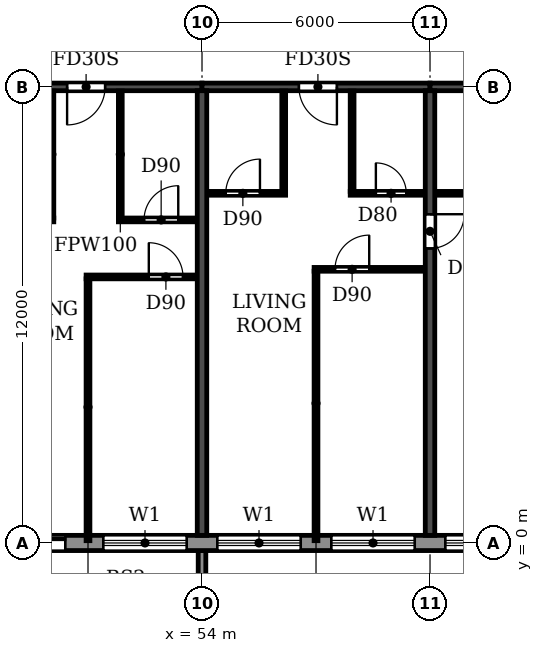
"""IFC4 building model, lengths in metres.
Left out: names, types, materials, properties, quantities, classifications, styles, units other than length and angle.
Written with IfcOpenShell. Run it as: python <this file> out.ifc"""

import sys

from ifc_helpers import new_model, si_unit, direction, frame, frame_2d, origin, place, context, subcontext, project, spatial, polyline, rectangle, outline, extrude, source, transform, mapped, element, fill, save


model = new_model("IFC4")
c1 = context("Model", 3, precision=1e-05, world=origin(), true_north=direction((0.0, 1.0)))
c2 = subcontext(c1, "Body", "Model", "MODEL_VIEW")
j1 = project(units=[si_unit("LENGTHUNIT", "METRE"), si_unit("PLANEANGLEUNIT", "RADIAN")], contexts=[c1])
p1 = place(None, origin())
s1 = spatial("IfcSite", under=j1, at=p1, CompositionType="ELEMENT")
p2 = place(p1, origin())
s2 = spatial("IfcBuilding", under=s1, at=p2, CompositionType="ELEMENT")
p3 = place(p2, frame((0.0, 0.0, 208.2)))
s3 = spatial("IfcBuildingStorey", under=s2, at=p3, CompositionType="ELEMENT", Elevation=208.2)
p4 = place(p3, frame((54.0, 0.2, 0.0), z_axis=(0.0, 0.0, 1.0), x_axis=(0.0, 1.0, 0.0)))
e1 = element("IfcWall", 1, at=p4, inside=s3, PredefinedType="SHEAR", context=c2, shape_type="SweptSolid", body=[
    extrude(rectangle(XDim=11.7, YDim=0.25, at=frame_2d((5.85, 0.0))), origin(), (0.0, 0.0, 1.0), 3.0),
])
p5 = place(p3, frame((60.0, 0.2, 0.0), z_axis=(0.0, 0.0, 1.0), x_axis=(0.0, 1.0, 0.0)))
e2 = element("IfcWall", 2, at=p5, inside=s3, PredefinedType="SHEAR", context=c2, shape_type="SweptSolid", body=[
    extrude(rectangle(XDim=11.7, YDim=0.25, at=frame_2d((5.85, 0.0))), origin(), (0.0, 0.0, 1.0), 3.0),
])
p6 = place(p5, frame((7.55, 0.0, 0.0)))
e3 = element("IfcOpeningElement", 3, at=p6, cuts=e2, PredefinedType="OPENING", context=c2, shape_type="SweptSolid", body=[
    extrude(rectangle(XDim=0.9, YDim=2.1, at=frame_2d((0.45, 1.05))), frame((0.0, 0.135, 0.0), z_axis=(0.0, -1.0, 0.0), x_axis=(1.0, 0.0, 0.0)), (0.0, 0.0, 1.0), 0.27),
])
p7 = place(p3, frame((48.0, 12.0, 0.0), z_axis=(0.0, 0.0, 1.0), x_axis=(1.0, 0.0, 0.0)))
e4 = element("IfcWall", 4, at=p7, inside=s3, PredefinedType="SHEAR", context=c2, shape_type="SweptSolid", body=[
    extrude(rectangle(XDim=6.0, YDim=0.2, at=frame_2d((3.0, 0.0))), origin(), (0.0, 0.0, 1.0), 2.4),
])
p8 = place(p7, frame((2.45, 0.0, 0.0)))
e5 = element("IfcOpeningElement", 5, at=p8, cuts=e4, PredefinedType="OPENING", context=c2, shape_type="SweptSolid", body=[
    extrude(rectangle(XDim=1.0, YDim=2.1, at=frame_2d((0.5, 1.05))), frame((0.0, 0.11, 0.0), z_axis=(0.0, -1.0, 0.0), x_axis=(1.0, 0.0, 0.0)), (0.0, 0.0, 1.0), 0.22),
])
p9 = place(p3, frame((54.0, 12.0, 0.0), z_axis=(0.0, 0.0, 1.0), x_axis=(1.0, 0.0, 0.0)))
e6 = element("IfcWall", 6, at=p9, inside=s3, PredefinedType="SHEAR", context=c2, shape_type="SweptSolid", body=[
    extrude(rectangle(XDim=6.0, YDim=0.2, at=frame_2d((3.0, 0.0))), origin(), (0.0, 0.0, 1.0), 2.4),
])
p10 = place(p9, frame((2.55, 0.0, 0.0)))
e7 = element("IfcOpeningElement", 7, at=p10, cuts=e6, PredefinedType="OPENING", context=c2, shape_type="SweptSolid", body=[
    extrude(rectangle(XDim=1.0, YDim=2.1, at=frame_2d((0.5, 1.05))), frame((0.0, 0.11, 0.0), z_axis=(0.0, -1.0, 0.0), x_axis=(1.0, 0.0, 0.0)), (0.0, 0.0, 1.0), 0.22),
])
p11 = place(p3, frame((60.0, 12.0, 0.0), z_axis=(0.0, 0.0, 1.0), x_axis=(1.0, 0.0, 0.0)))
e8 = element("IfcWall", 8, at=p11, inside=s3, PredefinedType="SHEAR", context=c2, shape_type="SweptSolid", body=[
    extrude(rectangle(XDim=6.0, YDim=0.2, at=frame_2d((3.0, 0.0))), origin(), (0.0, 0.0, 1.0), 2.4),
])
p12 = place(p3, frame((22.683, 0.0, 0.0), z_axis=(0.0, 0.0, 1.0), x_axis=(1.0, 0.0, 0.0)))
e9 = element("IfcWall", 9, at=p12, inside=s3, PredefinedType="STANDARD", context=c2, shape_type="SweptSolid", body=[
    extrude(rectangle(XDim=56.634, YDim=0.4, at=frame_2d((28.317, 0.0))), origin(), (0.0, 0.0, 1.0), 3.0),
])
p13 = place(p12, frame((1.917, 0.0, 0.0)))
e10 = element("IfcOpeningElement", 10, at=p13, cuts=e9, PredefinedType="OPENING", context=c2, shape_type="SweptSolid", body=[
    extrude(rectangle(XDim=1.8, YDim=2.4, at=frame_2d((0.9, 1.2))), frame((0.0, 0.21, 0.0), z_axis=(0.0, -1.0, 0.0), x_axis=(1.0, 0.0, 0.0)), (0.0, 0.0, 1.0), 0.42),
])
p14 = place(p12, frame((4.717, 0.0, 0.9)))
e11 = element("IfcOpeningElement", 11, at=p14, cuts=e9, PredefinedType="OPENING", context=c2, shape_type="SweptSolid", body=[
    extrude(rectangle(XDim=2.2, YDim=1.5, at=frame_2d((1.1, 0.75))), frame((0.0, 0.21, 0.0), z_axis=(0.0, -1.0, 0.0), x_axis=(1.0, 0.0, 0.0)), (0.0, 0.0, 1.0), 0.42),
])
p15 = place(p12, frame((7.717, 0.0, 0.9)))
e12 = element("IfcOpeningElement", 12, at=p15, cuts=e9, PredefinedType="OPENING", context=c2, shape_type="SweptSolid", body=[
    extrude(rectangle(XDim=2.2, YDim=1.5, at=frame_2d((1.1, 0.75))), frame((0.0, 0.21, 0.0), z_axis=(0.0, -1.0, 0.0), x_axis=(1.0, 0.0, 0.0)), (0.0, 0.0, 1.0), 0.42),
])
p16 = place(p12, frame((10.717, 0.0, 0.9)))
e13 = element("IfcOpeningElement", 13, at=p16, cuts=e9, PredefinedType="OPENING", context=c2, shape_type="SweptSolid", body=[
    extrude(rectangle(XDim=2.2, YDim=1.5, at=frame_2d((1.1, 0.75))), frame((0.0, 0.21, 0.0), z_axis=(0.0, -1.0, 0.0), x_axis=(1.0, 0.0, 0.0)), (0.0, 0.0, 1.0), 0.42),
])
p17 = place(p12, frame((13.917, 0.0, 0.0)))
e14 = element("IfcOpeningElement", 14, at=p17, cuts=e9, PredefinedType="OPENING", context=c2, shape_type="SweptSolid", body=[
    extrude(rectangle(XDim=1.8, YDim=2.4, at=frame_2d((0.9, 1.2))), frame((0.0, 0.21, 0.0), z_axis=(0.0, -1.0, 0.0), x_axis=(1.0, 0.0, 0.0)), (0.0, 0.0, 1.0), 0.42),
])
p18 = place(p12, frame((16.717, 0.0, 0.9)))
e15 = element("IfcOpeningElement", 15, at=p18, cuts=e9, PredefinedType="OPENING", context=c2, shape_type="SweptSolid", body=[
    extrude(rectangle(XDim=2.2, YDim=1.5, at=frame_2d((1.1, 0.75))), frame((0.0, 0.21, 0.0), z_axis=(0.0, -1.0, 0.0), x_axis=(1.0, 0.0, 0.0)), (0.0, 0.0, 1.0), 0.42),
])
p19 = place(p12, frame((19.717, 0.0, 0.9)))
e16 = element("IfcOpeningElement", 16, at=p19, cuts=e9, PredefinedType="OPENING", context=c2, shape_type="SweptSolid", body=[
    extrude(rectangle(XDim=2.2, YDim=1.5, at=frame_2d((1.1, 0.75))), frame((0.0, 0.21, 0.0), z_axis=(0.0, -1.0, 0.0), x_axis=(1.0, 0.0, 0.0)), (0.0, 0.0, 1.0), 0.42),
])
p20 = place(p12, frame((22.717, 0.0, 0.9)))
e17 = element("IfcOpeningElement", 17, at=p20, cuts=e9, PredefinedType="OPENING", context=c2, shape_type="SweptSolid", body=[
    extrude(rectangle(XDim=2.2, YDim=1.5, at=frame_2d((1.1, 0.75))), frame((0.0, 0.21, 0.0), z_axis=(0.0, -1.0, 0.0), x_axis=(1.0, 0.0, 0.0)), (0.0, 0.0, 1.0), 0.42),
])
p21 = place(p12, frame((25.917, 0.0, 0.0)))
e18 = element("IfcOpeningElement", 18, at=p21, cuts=e9, PredefinedType="OPENING", context=c2, shape_type="SweptSolid", body=[
    extrude(rectangle(XDim=1.8, YDim=2.4, at=frame_2d((0.9, 1.2))), frame((0.0, 0.21, 0.0), z_axis=(0.0, -1.0, 0.0), x_axis=(1.0, 0.0, 0.0)), (0.0, 0.0, 1.0), 0.42),
])
p22 = place(p12, frame((28.717, 0.0, 0.9)))
e19 = element("IfcOpeningElement", 19, at=p22, cuts=e9, PredefinedType="OPENING", context=c2, shape_type="SweptSolid", body=[
    extrude(rectangle(XDim=2.2, YDim=1.5, at=frame_2d((1.1, 0.75))), frame((0.0, 0.21, 0.0), z_axis=(0.0, -1.0, 0.0), x_axis=(1.0, 0.0, 0.0)), (0.0, 0.0, 1.0), 0.42),
])
p23 = place(p12, frame((31.717, 0.0, 0.9)))
e20 = element("IfcOpeningElement", 20, at=p23, cuts=e9, PredefinedType="OPENING", context=c2, shape_type="SweptSolid", body=[
    extrude(rectangle(XDim=2.2, YDim=1.5, at=frame_2d((1.1, 0.75))), frame((0.0, 0.21, 0.0), z_axis=(0.0, -1.0, 0.0), x_axis=(1.0, 0.0, 0.0)), (0.0, 0.0, 1.0), 0.42),
])
p24 = place(p12, frame((34.717, 0.0, 0.9)))
e21 = element("IfcOpeningElement", 21, at=p24, cuts=e9, PredefinedType="OPENING", context=c2, shape_type="SweptSolid", body=[
    extrude(rectangle(XDim=2.2, YDim=1.5, at=frame_2d((1.1, 0.75))), frame((0.0, 0.21, 0.0), z_axis=(0.0, -1.0, 0.0), x_axis=(1.0, 0.0, 0.0)), (0.0, 0.0, 1.0), 0.42),
])
p25 = place(p12, frame((37.717, 0.0, 0.9)))
e22 = element("IfcOpeningElement", 22, at=p25, cuts=e9, PredefinedType="OPENING", context=c2, shape_type="SweptSolid", body=[
    extrude(rectangle(XDim=2.2, YDim=1.5, at=frame_2d((1.1, 0.75))), frame((0.0, 0.21, 0.0), z_axis=(0.0, -1.0, 0.0), x_axis=(1.0, 0.0, 0.0)), (0.0, 0.0, 1.0), 0.42),
])
p26 = place(p12, frame((40.717, 0.0, 0.9)))
e23 = element("IfcOpeningElement", 23, at=p26, cuts=e9, PredefinedType="OPENING", context=c2, shape_type="SweptSolid", body=[
    extrude(rectangle(XDim=2.2, YDim=1.5, at=frame_2d((1.1, 0.75))), frame((0.0, 0.21, 0.0), z_axis=(0.0, -1.0, 0.0), x_axis=(1.0, 0.0, 0.0)), (0.0, 0.0, 1.0), 0.42),
])
p27 = place(p12, frame((43.717, 0.0, 0.9)))
e24 = element("IfcOpeningElement", 24, at=p27, cuts=e9, PredefinedType="OPENING", context=c2, shape_type="SweptSolid", body=[
    extrude(rectangle(XDim=2.2, YDim=1.5, at=frame_2d((1.1, 0.75))), frame((0.0, 0.21, 0.0), z_axis=(0.0, -1.0, 0.0), x_axis=(1.0, 0.0, 0.0)), (0.0, 0.0, 1.0), 0.42),
])
p28 = place(p12, frame((46.717, 0.0, 0.9)))
e25 = element("IfcOpeningElement", 25, at=p28, cuts=e9, PredefinedType="OPENING", context=c2, shape_type="SweptSolid", body=[
    extrude(rectangle(XDim=2.2, YDim=1.5, at=frame_2d((1.1, 0.75))), frame((0.0, 0.21, 0.0), z_axis=(0.0, -1.0, 0.0), x_axis=(1.0, 0.0, 0.0)), (0.0, 0.0, 1.0), 0.42),
])
p29 = place(p12, frame((49.717, 0.0, 0.9)))
e26 = element("IfcOpeningElement", 26, at=p29, cuts=e9, PredefinedType="OPENING", context=c2, shape_type="SweptSolid", body=[
    extrude(rectangle(XDim=2.2, YDim=1.5, at=frame_2d((1.1, 0.75))), frame((0.0, 0.21, 0.0), z_axis=(0.0, -1.0, 0.0), x_axis=(1.0, 0.0, 0.0)), (0.0, 0.0, 1.0), 0.42),
])
p30 = place(p12, frame((52.917, 0.0, 0.0)))
e27 = element("IfcOpeningElement", 27, at=p30, cuts=e9, PredefinedType="OPENING", context=c2, shape_type="SweptSolid", body=[
    extrude(rectangle(XDim=1.8, YDim=2.4, at=frame_2d((0.9, 1.2))), frame((0.0, 0.21, 0.0), z_axis=(0.0, -1.0, 0.0), x_axis=(1.0, 0.0, 0.0)), (0.0, 0.0, 1.0), 0.42),
])
m1 = source(origin(), c2, "Body", "SweptSolid", [
    extrude(outline(polyline([(0.0, 0.0), (0.2, 0.0), (0.2, 1.65), (0.0, 1.65), (0.0, 0.0)])), origin(), (0.0, 0.0, 1.0), 3.1),
])
p31 = place(p3, frame((53.9, -1.85, 0.0)))
e28 = element("IfcWall", 28, at=p31, inside=s3, PredefinedType="STANDARD", context=c2, shape_type="MappedRepresentation", body=[
    mapped(m1, transform((0.0, 0.0, 0.0))),
])
p32 = place(p3, frame((50.95, 7.0, 0.0), z_axis=(0.0, 0.0, 1.0), x_axis=(1.0, 0.0, 0.0)))
e29 = element("IfcWall", 29, at=p32, inside=s3, PredefinedType="PARTITIONING", context=c2, shape_type="SweptSolid", body=[
    extrude(rectangle(XDim=2.915, YDim=0.1, at=frame_2d((1.458, 0.0))), origin(), (0.0, 0.0, 1.0), 3.0),
])
p33 = place(p32, frame((1.65, 0.0, 0.0)))
e30 = element("IfcOpeningElement", 30, at=p33, cuts=e29, PredefinedType="OPENING", context=c2, shape_type="SweptSolid", body=[
    extrude(rectangle(XDim=0.9, YDim=2.1, at=frame_2d((0.45, 1.05))), frame((0.0, 0.06, 0.0), z_axis=(0.0, -1.0, 0.0), x_axis=(1.0, 0.0, 0.0)), (0.0, 0.0, 1.0), 0.12),
])
p34 = place(p3, frame((56.95, 7.2, 0.0), z_axis=(0.0, 0.0, 1.0), x_axis=(1.0, 0.0, 0.0)))
e31 = element("IfcWall", 31, at=p34, inside=s3, PredefinedType="PARTITIONING", context=c2, shape_type="SweptSolid", body=[
    extrude(rectangle(XDim=2.915, YDim=0.1, at=frame_2d((1.458, 0.0))), origin(), (0.0, 0.0, 1.0), 3.0),
])
p35 = place(p34, frame((0.55, 0.0, 0.0)))
e32 = element("IfcOpeningElement", 32, at=p35, cuts=e31, PredefinedType="OPENING", context=c2, shape_type="SweptSolid", body=[
    extrude(rectangle(XDim=0.9, YDim=2.1, at=frame_2d((0.45, 1.05))), frame((0.0, 0.06, 0.0), z_axis=(0.0, -1.0, 0.0), x_axis=(1.0, 0.0, 0.0)), (0.0, 0.0, 1.0), 0.12),
])
p36 = place(p3, frame((48.135, 8.5, 0.0), z_axis=(0.0, 0.0, 1.0), x_axis=(1.0, 0.0, 0.0)))
e33 = element("IfcWall", 33, at=p36, inside=s3, PredefinedType="PARTITIONING", context=c2, shape_type="SweptSolid", body=[
    extrude(rectangle(XDim=1.965, YDim=0.1, at=frame_2d((0.982, 0.0))), origin(), (0.0, 0.0, 1.0), 3.0),
])
p37 = place(p36, frame((0.49, 0.0, 0.0)))
e34 = element("IfcOpeningElement", 34, at=p37, cuts=e33, PredefinedType="OPENING", context=c2, shape_type="SweptSolid", body=[
    extrude(rectangle(XDim=0.8, YDim=2.1, at=frame_2d((0.4, 1.05))), frame((0.0, 0.06, 0.0), z_axis=(0.0, -1.0, 0.0), x_axis=(1.0, 0.0, 0.0)), (0.0, 0.0, 1.0), 0.12),
])
p38 = place(p3, frame((51.8, 8.5, 0.0), z_axis=(0.0, 0.0, 1.0), x_axis=(1.0, 0.0, 0.0)))
e35 = element("IfcWall", 35, at=p38, inside=s3, PredefinedType="PARTITIONING", context=c2, shape_type="SweptSolid", body=[
    extrude(rectangle(XDim=2.065, YDim=0.1, at=frame_2d((1.032, 0.0))), origin(), (0.0, 0.0, 1.0), 3.0),
])
p39 = place(p38, frame((0.675, 0.0, 0.0)))
e36 = element("IfcOpeningElement", 36, at=p39, cuts=e35, PredefinedType="OPENING", context=c2, shape_type="SweptSolid", body=[
    extrude(rectangle(XDim=0.9, YDim=2.1, at=frame_2d((0.45, 1.05))), frame((0.0, 0.06, 0.0), z_axis=(0.0, -1.0, 0.0), x_axis=(1.0, 0.0, 0.0)), (0.0, 0.0, 1.0), 0.12),
])
p40 = place(p3, frame((54.135, 9.2, 0.0), z_axis=(0.0, 0.0, 1.0), x_axis=(1.0, 0.0, 0.0)))
e37 = element("IfcWall", 37, at=p40, inside=s3, PredefinedType="PARTITIONING", context=c2, shape_type="SweptSolid", body=[
    extrude(rectangle(XDim=2.065, YDim=0.1, at=frame_2d((1.032, 0.0))), origin(), (0.0, 0.0, 1.0), 3.0),
])
p41 = place(p40, frame((0.49, 0.0, 0.0)))
e38 = element("IfcOpeningElement", 38, at=p41, cuts=e37, PredefinedType="OPENING", context=c2, shape_type="SweptSolid", body=[
    extrude(rectangle(XDim=0.9, YDim=2.1, at=frame_2d((0.45, 1.05))), frame((0.0, 0.06, 0.0), z_axis=(0.0, -1.0, 0.0), x_axis=(1.0, 0.0, 0.0)), (0.0, 0.0, 1.0), 0.12),
])
p42 = place(p3, frame((57.9, 9.2, 0.0), z_axis=(0.0, 0.0, 1.0), x_axis=(1.0, 0.0, 0.0)))
e39 = element("IfcWall", 39, at=p42, inside=s3, PredefinedType="PARTITIONING", context=c2, shape_type="SweptSolid", body=[
    extrude(rectangle(XDim=1.965, YDim=0.1, at=frame_2d((0.982, 0.0))), origin(), (0.0, 0.0, 1.0), 3.0),
])
p43 = place(p42, frame((0.675, 0.0, 0.0)))
e40 = element("IfcOpeningElement", 40, at=p43, cuts=e39, PredefinedType="OPENING", context=c2, shape_type="SweptSolid", body=[
    extrude(rectangle(XDim=0.8, YDim=2.1, at=frame_2d((0.4, 1.05))), frame((0.0, 0.06, 0.0), z_axis=(0.0, -1.0, 0.0), x_axis=(1.0, 0.0, 0.0)), (0.0, 0.0, 1.0), 0.12),
])
p44 = place(p3, frame((60.135, 9.2, 0.0), z_axis=(0.0, 0.0, 1.0), x_axis=(1.0, 0.0, 0.0)))
e41 = element("IfcWall", 41, at=p44, inside=s3, PredefinedType="PARTITIONING", context=c2, shape_type="SweptSolid", body=[
    extrude(rectangle(XDim=2.765, YDim=0.1, at=frame_2d((1.382, 0.0))), origin(), (0.0, 0.0, 1.0), 3.0),
])
p45 = place(p44, frame((0.965, 0.0, 0.0)))
e42 = element("IfcOpeningElement", 42, at=p45, cuts=e41, PredefinedType="OPENING", context=c2, shape_type="SweptSolid", body=[
    extrude(rectangle(XDim=0.8, YDim=2.1, at=frame_2d((0.4, 1.05))), frame((0.0, 0.06, 0.0), z_axis=(0.0, -1.0, 0.0), x_axis=(1.0, 0.0, 0.0)), (0.0, 0.0, 1.0), 0.12),
])
p46 = place(p3, frame((50.05, 8.55, 0.0), z_axis=(0.0, 0.0, 1.0), x_axis=(0.0, 1.0, 0.0)))
e43 = element("IfcWall", 43, at=p46, inside=s3, PredefinedType="PARTITIONING", context=c2, shape_type="SweptSolid", body=[
    extrude(rectangle(XDim=3.34, YDim=0.1, at=frame_2d((1.67, 0.0))), origin(), (0.0, 0.0, 1.0), 3.0),
])
p47 = place(p3, frame((51.0, 0.06, 0.0), z_axis=(0.0, 0.0, 1.0), x_axis=(0.0, 1.0, 0.0)))
e44 = element("IfcWall", 44, at=p47, inside=s3, PredefinedType="PARTITIONING", context=c2, shape_type="SweptSolid", body=[
    extrude(rectangle(XDim=6.89, YDim=0.1, at=frame_2d((3.445, 0.0))), origin(), (0.0, 0.0, 1.0), 3.0),
])
p48 = place(p3, frame((51.85, 8.55, 0.0), z_axis=(0.0, 0.0, 1.0), x_axis=(0.0, 1.0, 0.0)))
e45 = element("IfcWall", 45, at=p48, inside=s3, PredefinedType="PARTITIONING", context=c2, shape_type="SweptSolid", body=[
    extrude(rectangle(XDim=3.34, YDim=0.1, at=frame_2d((1.67, 0.0))), origin(), (0.0, 0.0, 1.0), 3.0),
])
p49 = place(p3, frame((56.15, 9.25, 0.0), z_axis=(0.0, 0.0, 1.0), x_axis=(0.0, 1.0, 0.0)))
e46 = element("IfcWall", 46, at=p49, inside=s3, PredefinedType="PARTITIONING", context=c2, shape_type="SweptSolid", body=[
    extrude(rectangle(XDim=2.64, YDim=0.1, at=frame_2d((1.32, 0.0))), origin(), (0.0, 0.0, 1.0), 3.0),
])
p50 = place(p3, frame((57.0, 0.06, 0.0), z_axis=(0.0, 0.0, 1.0), x_axis=(0.0, 1.0, 0.0)))
e47 = element("IfcWall", 47, at=p50, inside=s3, PredefinedType="PARTITIONING", context=c2, shape_type="SweptSolid", body=[
    extrude(rectangle(XDim=7.09, YDim=0.1, at=frame_2d((3.545, 0.0))), origin(), (0.0, 0.0, 1.0), 3.0),
])
p51 = place(p3, frame((57.95, 9.25, 0.0), z_axis=(0.0, 0.0, 1.0), x_axis=(0.0, 1.0, 0.0)))
e48 = element("IfcWall", 48, at=p51, inside=s3, PredefinedType="PARTITIONING", context=c2, shape_type="SweptSolid", body=[
    extrude(rectangle(XDim=2.64, YDim=0.1, at=frame_2d((1.32, 0.0))), origin(), (0.0, 0.0, 1.0), 3.0),
])
p52 = place(p21, origin())
e49 = element("IfcDoor", 49, at=p52, inside=s3, OperationType="DOUBLE_DOOR_SLIDING", PredefinedType="DOOR", context=c2, shape_type="SweptSolid", body=[
    extrude(rectangle(XDim=1.8, YDim=2.4, at=frame_2d((0.9, 1.2))), frame((0.0, 0.025, 0.0), z_axis=(0.0, -1.0, 0.0), x_axis=(1.0, 0.0, 0.0)), (0.0, 0.0, 1.0), 0.05),
])
fill(e18, e49)
p53 = place(p22, origin())
e50 = element("IfcWindow", 50, at=p53, inside=s3, PartitioningType="DOUBLE_PANEL_HORIZONTAL", PredefinedType="WINDOW", context=c2, shape_type="SweptSolid", body=[
    extrude(rectangle(XDim=2.2, YDim=1.5, at=frame_2d((1.1, 0.75))), frame((0.0, 0.03, 0.0), z_axis=(0.0, -1.0, 0.0), x_axis=(1.0, 0.0, 0.0)), (0.0, 0.0, 1.0), 0.06),
])
fill(e19, e50)
p54 = place(p23, origin())
e51 = element("IfcWindow", 51, at=p54, inside=s3, PartitioningType="DOUBLE_PANEL_HORIZONTAL", PredefinedType="WINDOW", context=c2, shape_type="SweptSolid", body=[
    extrude(rectangle(XDim=2.2, YDim=1.5, at=frame_2d((1.1, 0.75))), frame((0.0, 0.03, 0.0), z_axis=(0.0, -1.0, 0.0), x_axis=(1.0, 0.0, 0.0)), (0.0, 0.0, 1.0), 0.06),
])
fill(e20, e51)
p55 = place(p24, origin())
e52 = element("IfcWindow", 52, at=p55, inside=s3, PartitioningType="DOUBLE_PANEL_HORIZONTAL", PredefinedType="WINDOW", context=c2, shape_type="SweptSolid", body=[
    extrude(rectangle(XDim=2.2, YDim=1.5, at=frame_2d((1.1, 0.75))), frame((0.0, 0.03, 0.0), z_axis=(0.0, -1.0, 0.0), x_axis=(1.0, 0.0, 0.0)), (0.0, 0.0, 1.0), 0.06),
])
fill(e21, e52)
p56 = place(p25, origin())
e53 = element("IfcWindow", 53, at=p56, inside=s3, PartitioningType="DOUBLE_PANEL_HORIZONTAL", PredefinedType="WINDOW", context=c2, shape_type="SweptSolid", body=[
    extrude(rectangle(XDim=2.2, YDim=1.5, at=frame_2d((1.1, 0.75))), frame((0.0, 0.03, 0.0), z_axis=(0.0, -1.0, 0.0), x_axis=(1.0, 0.0, 0.0)), (0.0, 0.0, 1.0), 0.06),
])
fill(e22, e53)
p57 = place(p8, frame((1.0, 0.0, 0.0), z_axis=(0.0, 0.0, 1.0), x_axis=(-1.0, 0.0, 0.0)))
e54 = element("IfcDoor", 54, at=p57, inside=s3, OperationType="SINGLE_SWING_RIGHT", PredefinedType="DOOR", context=c2, shape_type="SweptSolid", body=[
    extrude(rectangle(XDim=1.0, YDim=2.1, at=frame_2d((0.5, 1.05))), frame((0.0, 0.025, 0.0), z_axis=(0.0, -1.0, 0.0), x_axis=(1.0, 0.0, 0.0)), (0.0, 0.0, 1.0), 0.05),
])
fill(e5, e54)
p58 = place(p39, origin())
e55 = element("IfcDoor", 55, at=p58, inside=s3, OperationType="SINGLE_SWING_RIGHT", PredefinedType="DOOR", context=c2, shape_type="SweptSolid", body=[
    extrude(rectangle(XDim=0.9, YDim=2.1, at=frame_2d((0.45, 1.05))), frame((0.0, 0.025, 0.0), z_axis=(0.0, -1.0, 0.0), x_axis=(1.0, 0.0, 0.0)), (0.0, 0.0, 1.0), 0.05),
])
fill(e36, e55)
p59 = place(p33, origin())
e56 = element("IfcDoor", 56, at=p59, inside=s3, OperationType="SINGLE_SWING_LEFT", PredefinedType="DOOR", context=c2, shape_type="SweptSolid", body=[
    extrude(rectangle(XDim=0.9, YDim=2.1, at=frame_2d((0.45, 1.05))), frame((0.0, 0.025, 0.0), z_axis=(0.0, -1.0, 0.0), x_axis=(1.0, 0.0, 0.0)), (0.0, 0.0, 1.0), 0.05),
])
fill(e30, e56)
p60 = place(p41, origin())
e57 = element("IfcDoor", 57, at=p60, inside=s3, OperationType="SINGLE_SWING_RIGHT", PredefinedType="DOOR", context=c2, shape_type="SweptSolid", body=[
    extrude(rectangle(XDim=0.9, YDim=2.1, at=frame_2d((0.45, 1.05))), frame((0.0, 0.025, 0.0), z_axis=(0.0, -1.0, 0.0), x_axis=(1.0, 0.0, 0.0)), (0.0, 0.0, 1.0), 0.05),
])
fill(e38, e57)
p61 = place(p10, frame((1.0, 0.0, 0.0), z_axis=(0.0, 0.0, 1.0), x_axis=(-1.0, 0.0, 0.0)))
e58 = element("IfcDoor", 58, at=p61, inside=s3, OperationType="SINGLE_SWING_LEFT", PredefinedType="DOOR", context=c2, shape_type="SweptSolid", body=[
    extrude(rectangle(XDim=1.0, YDim=2.1, at=frame_2d((0.5, 1.05))), frame((0.0, 0.025, 0.0), z_axis=(0.0, -1.0, 0.0), x_axis=(1.0, 0.0, 0.0)), (0.0, 0.0, 1.0), 0.05),
])
fill(e7, e58)
p62 = place(p35, origin())
e59 = element("IfcDoor", 59, at=p62, inside=s3, OperationType="SINGLE_SWING_RIGHT", PredefinedType="DOOR", context=c2, shape_type="SweptSolid", body=[
    extrude(rectangle(XDim=0.9, YDim=2.1, at=frame_2d((0.45, 1.05))), frame((0.0, 0.025, 0.0), z_axis=(0.0, -1.0, 0.0), x_axis=(1.0, 0.0, 0.0)), (0.0, 0.0, 1.0), 0.05),
])
fill(e32, e59)
p63 = place(p43, origin())
e60 = element("IfcDoor", 60, at=p63, inside=s3, OperationType="SINGLE_SWING_LEFT", PredefinedType="DOOR", context=c2, shape_type="SweptSolid", body=[
    extrude(rectangle(XDim=0.8, YDim=2.1, at=frame_2d((0.4, 1.05))), frame((0.0, 0.025, 0.0), z_axis=(0.0, -1.0, 0.0), x_axis=(1.0, 0.0, 0.0)), (0.0, 0.0, 1.0), 0.05),
])
fill(e40, e60)
p64 = place(p6, frame((0.9, 0.0, 0.0), z_axis=(0.0, 0.0, 1.0), x_axis=(-1.0, 0.0, 0.0)))
e61 = element("IfcDoor", 61, at=p64, inside=s3, OperationType="SINGLE_SWING_LEFT", PredefinedType="DOOR", context=c2, shape_type="SweptSolid", body=[
    extrude(rectangle(XDim=0.9, YDim=2.1, at=frame_2d((0.45, 1.05))), frame((0.0, 0.025, 0.0), z_axis=(0.0, -1.0, 0.0), x_axis=(1.0, 0.0, 0.0)), (0.0, 0.0, 1.0), 0.05),
])
fill(e3, e61)
save(model, sys.argv[1])
